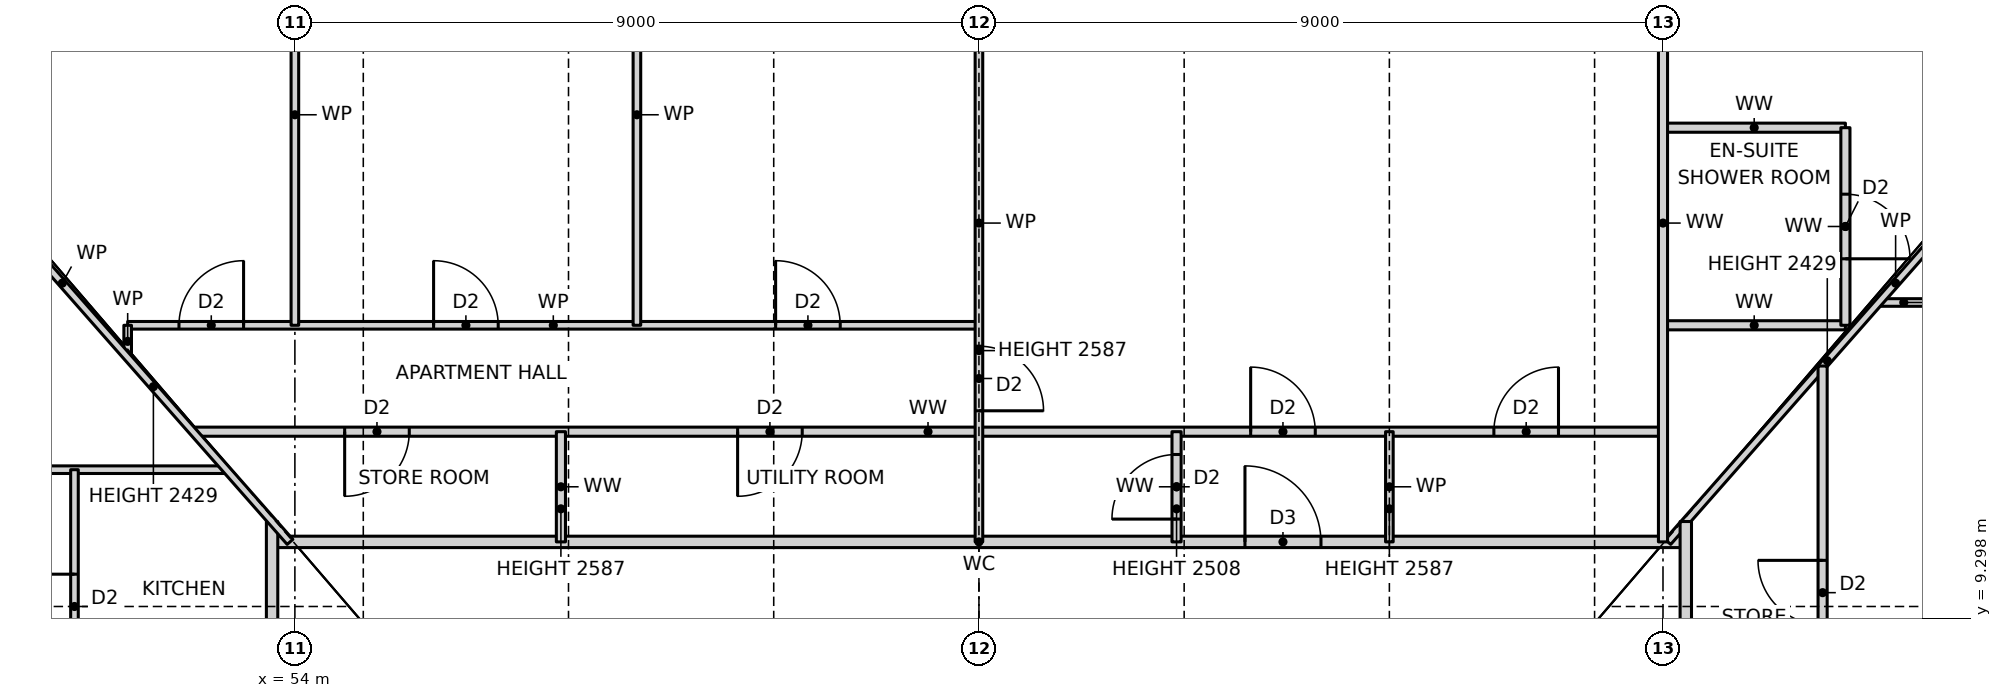
"""IFC4 building model, lengths in metres.
Left out: names, types, materials, properties, quantities, classifications, styles, units other than length and angle.
Written with IfcOpenShell. Run it as: python <this file> out.ifc"""

import sys

from ifc_helpers import new_model, si_unit, direction, frame, frame_2d, origin, place, context, subcontext, project, spatial, rectangle, extrude, element, fill, save


model = new_model("IFC4")
c1 = context("Model", 3, precision=1e-05, world=origin(), true_north=direction((0.0, 1.0)))
c2 = subcontext(c1, "Body", "Model", "MODEL_VIEW")
j1 = project(units=[si_unit("LENGTHUNIT", "METRE"), si_unit("PLANEANGLEUNIT", "RADIAN")], contexts=[c1])
p1 = place(None, origin())
s1 = spatial("IfcSite", under=j1, at=p1, CompositionType="ELEMENT")
p2 = place(p1, origin())
s2 = spatial("IfcBuilding", under=s1, at=p2, CompositionType="ELEMENT")
p3 = place(p2, frame((0.0, 0.0, 46.5)))
s3 = spatial("IfcBuildingStorey", under=s2, at=p3, CompositionType="ELEMENT", Elevation=46.5)
p4 = place(p3, frame((53.7, 10.3, 0.0), z_axis=(0.0, 0.0, 1.0), x_axis=(1.0, 0.0, 0.0)))
e1 = element("IfcWall", 1, at=p4, inside=s3, PredefinedType="PARTITIONING", context=c2, shape_type="SweptSolid", body=[
    extrude(rectangle(XDim=18.6, YDim=0.15, at=frame_2d((9.3, 0.0))), origin(), (0.0, 0.0, 1.0), 3.27),
])
p5 = place(p4, frame((12.8, 0.0, 0.0)))
e2 = element("IfcOpeningElement", 2, at=p5, cuts=e1, PredefinedType="OPENING", context=c2, shape_type="SweptSolid", body=[
    extrude(rectangle(XDim=1.0, YDim=2.1, at=frame_2d((0.5, 1.05))), frame((0.0, 0.085, 0.0), z_axis=(0.0, -1.0, 0.0), x_axis=(1.0, 0.0, 0.0)), (0.0, 0.0, 1.0), 0.17),
])
p6 = place(p3, frame((46.56, 11.25, 0.0), z_axis=(0.0, 0.0, 1.0), x_axis=(1.0, 0.0, 0.0)))
e3 = element("IfcWall", 3, at=p6, inside=s3, PredefinedType="PARTITIONING", context=c2, shape_type="SweptSolid", body=[
    extrude(rectangle(XDim=6.54, YDim=0.1, at=frame_2d((3.27, 0.0))), origin(), (0.0, 0.0, 1.0), 3.27),
])
p7 = place(p6, frame((1.845, 0.0, 0.0)))
e4 = element("IfcOpeningElement", 4, at=p7, cuts=e3, PredefinedType="OPENING", context=c2, shape_type="SweptSolid", body=[
    extrude(rectangle(XDim=0.85, YDim=2.1, at=frame_2d((0.425, 1.05))), frame((0.0, 0.06, 0.0), z_axis=(0.0, -1.0, 0.0), x_axis=(1.0, 0.0, 0.0)), (0.0, 0.0, 1.0), 0.12),
])
p8 = place(p3, frame((52.66, 11.75, 0.0), z_axis=(0.0, 0.0, 1.0), x_axis=(1.0, 0.0, 0.0)))
e5 = element("IfcWall", 5, at=p8, inside=s3, PredefinedType="PARTITIONING", context=c2, shape_type="SweptSolid", body=[
    extrude(rectangle(XDim=19.34, YDim=0.12, at=frame_2d((9.67, 0.0))), origin(), (0.0, 0.0, 1.0), 3.27),
])
p9 = place(p8, frame((17.115, 0.0, 0.0)))
e6 = element("IfcOpeningElement", 6, at=p9, cuts=e5, PredefinedType="OPENING", context=c2, shape_type="SweptSolid", body=[
    extrude(rectangle(XDim=0.85, YDim=2.1, at=frame_2d((0.425, 1.05))), frame((0.0, 0.07, 0.0), z_axis=(0.0, -1.0, 0.0), x_axis=(1.0, 0.0, 0.0)), (0.0, 0.0, 1.0), 0.14),
])
p10 = place(p8, frame((13.915, 0.0, 0.0)))
e7 = element("IfcOpeningElement", 7, at=p10, cuts=e5, PredefinedType="OPENING", context=c2, shape_type="SweptSolid", body=[
    extrude(rectangle(XDim=0.85, YDim=2.1, at=frame_2d((0.425, 1.05))), frame((0.0, 0.07, 0.0), z_axis=(0.0, -1.0, 0.0), x_axis=(1.0, 0.0, 0.0)), (0.0, 0.0, 1.0), 0.14),
])
p11 = place(p8, frame((7.165, 0.0, 0.0)))
e8 = element("IfcOpeningElement", 8, at=p11, cuts=e5, PredefinedType="OPENING", context=c2, shape_type="SweptSolid", body=[
    extrude(rectangle(XDim=0.85, YDim=2.1, at=frame_2d((0.425, 1.05))), frame((0.0, 0.07, 0.0), z_axis=(0.0, -1.0, 0.0), x_axis=(1.0, 0.0, 0.0)), (0.0, 0.0, 1.0), 0.14),
])
p12 = place(p8, frame((1.995, 0.0, 0.0)))
e9 = element("IfcOpeningElement", 9, at=p12, cuts=e5, PredefinedType="OPENING", context=c2, shape_type="SweptSolid", body=[
    extrude(rectangle(XDim=0.85, YDim=2.1, at=frame_2d((0.425, 1.05))), frame((0.0, 0.07, 0.0), z_axis=(0.0, -1.0, 0.0), x_axis=(1.0, 0.0, 0.0)), (0.0, 0.0, 1.0), 0.14),
])
p13 = place(p3, frame((51.8, 13.15, 0.0), z_axis=(0.0, 0.0, 1.0), x_axis=(1.0, 0.0, 0.0)))
e10 = element("IfcWall", 10, at=p13, inside=s3, PredefinedType="PARTITIONING", context=c2, shape_type="SweptSolid", body=[
    extrude(rectangle(XDim=11.2, YDim=0.1, at=frame_2d((5.6, 0.0))), origin(), (0.0, 0.0, 1.0), 3.27),
])
p14 = place(p13, frame((8.525, 0.0, 0.0)))
e11 = element("IfcOpeningElement", 11, at=p14, cuts=e10, PredefinedType="OPENING", context=c2, shape_type="SweptSolid", body=[
    extrude(rectangle(XDim=0.85, YDim=2.1, at=frame_2d((0.425, 1.05))), frame((0.0, 0.06, 0.0), z_axis=(0.0, -1.0, 0.0), x_axis=(1.0, 0.0, 0.0)), (0.0, 0.0, 1.0), 0.12),
])
p15 = place(p13, frame((4.025, 0.0, 0.0)))
e12 = element("IfcOpeningElement", 12, at=p15, cuts=e10, PredefinedType="OPENING", context=c2, shape_type="SweptSolid", body=[
    extrude(rectangle(XDim=0.85, YDim=2.1, at=frame_2d((0.425, 1.05))), frame((0.0, 0.06, 0.0), z_axis=(0.0, -1.0, 0.0), x_axis=(1.0, 0.0, 0.0)), (0.0, 0.0, 1.0), 0.12),
])
p16 = place(p13, frame((0.675, 0.0, 0.0)))
e13 = element("IfcOpeningElement", 13, at=p16, cuts=e10, PredefinedType="OPENING", context=c2, shape_type="SweptSolid", body=[
    extrude(rectangle(XDim=0.85, YDim=2.1, at=frame_2d((0.425, 1.05))), frame((0.0, 0.06, 0.0), z_axis=(0.0, -1.0, 0.0), x_axis=(1.0, 0.0, 0.0)), (0.0, 0.0, 1.0), 0.12),
])
p17 = place(p3, frame((72.0, 13.15, 0.0), z_axis=(0.0, 0.0, 1.0), x_axis=(1.0, 0.0, 0.0)))
e14 = element("IfcWall", 14, at=p17, inside=s3, PredefinedType="PARTITIONING", context=c2, shape_type="SweptSolid", body=[
    extrude(rectangle(XDim=2.4, YDim=0.12, at=frame_2d((1.2, 0.0))), origin(), (0.0, 0.0, 1.0), 3.27),
])
p18 = place(p3, frame((74.836, 13.45, 0.0), z_axis=(0.0, 0.0, 1.0), x_axis=(1.0, 0.0, 0.0)))
e15 = element("IfcWall", 15, at=p18, inside=s3, PredefinedType="PARTITIONING", context=c2, shape_type="SweptSolid", body=[
    extrude(rectangle(XDim=0.664, YDim=0.1, at=frame_2d((0.332, 0.0))), origin(), (0.0, 0.0, 1.0), 3.27),
])
p19 = place(p3, frame((72.0, 15.75, 0.0), z_axis=(0.0, 0.0, 1.0), x_axis=(1.0, 0.0, 0.0)))
e16 = element("IfcWall", 16, at=p19, inside=s3, PredefinedType="PARTITIONING", context=c2, shape_type="SweptSolid", body=[
    extrude(rectangle(XDim=2.4, YDim=0.12, at=frame_2d((1.2, 0.0))), origin(), (0.0, 0.0, 1.0), 3.27),
])
p20 = place(p3, frame((72.064, 10.3, 0.0), z_axis=(0.0, 0.0, 1.0), x_axis=(0.660700699661, 0.750649442461, 0.0)))
e17 = element("IfcWall", 17, at=p20, inside=s3, PredefinedType="PARTITIONING", context=c2, shape_type="SweptSolid", body=[
    extrude(rectangle(XDim=9.071, YDim=0.1, at=frame_2d((4.535, 0.0))), origin(), (0.0, 0.0, 1.0), 2.429),
])
p21 = place(p3, frame((74.4, 13.15, 0.0), z_axis=(0.0, 0.0, 1.0), x_axis=(0.0, 1.0, 0.0)))
e18 = element("IfcWall", 18, at=p21, inside=s3, PredefinedType="PARTITIONING", context=c2, shape_type="SweptSolid", body=[
    extrude(rectangle(XDim=2.6, YDim=0.12, at=frame_2d((1.3, 0.0))), origin(), (0.0, 0.0, 1.0), 3.27),
])
p22 = place(p21, frame((0.875, 0.0, 0.0)))
e19 = element("IfcOpeningElement", 19, at=p22, cuts=e18, PredefinedType="OPENING", context=c2, shape_type="SweptSolid", body=[
    extrude(rectangle(XDim=0.85, YDim=2.1, at=frame_2d((0.425, 1.05))), frame((0.0, 0.07, 0.0), z_axis=(0.0, -1.0, 0.0), x_axis=(1.0, 0.0, 0.0)), (0.0, 0.0, 1.0), 0.14),
])
p23 = place(p3, frame((74.1, -12.614, 0.0), z_axis=(0.0, 0.0, 1.0), x_axis=(0.0, 1.0, 0.0)))
e20 = element("IfcWall", 20, at=p23, inside=s3, PredefinedType="PARTITIONING", context=c2, shape_type="SweptSolid", body=[
    extrude(rectangle(XDim=25.228, YDim=0.12, at=frame_2d((12.614, 0.0))), origin(), (0.0, 0.0, 1.0), 3.27),
])
p24 = place(p23, frame((7.239, 0.0, 0.0)))
e21 = element("IfcOpeningElement", 21, at=p24, cuts=e20, PredefinedType="OPENING", context=c2, shape_type="SweptSolid", body=[
    extrude(rectangle(XDim=0.85, YDim=2.1, at=frame_2d((0.425, 1.05))), frame((0.0, 0.07, 0.0), z_axis=(0.0, -1.0, 0.0), x_axis=(1.0, 0.0, 0.0)), (0.0, 0.0, 1.0), 0.14),
])
p25 = place(p23, frame((10.439, 0.0, 0.0)))
e22 = element("IfcOpeningElement", 22, at=p25, cuts=e20, PredefinedType="OPENING", context=c2, shape_type="SweptSolid", body=[
    extrude(rectangle(XDim=0.85, YDim=2.1, at=frame_2d((0.425, 1.05))), frame((0.0, 0.07, 0.0), z_axis=(0.0, -1.0, 0.0), x_axis=(1.0, 0.0, 0.0)), (0.0, 0.0, 1.0), 0.14),
])
p26 = place(p23, frame((2.507, 0.0, 0.0)))
e23 = element("IfcOpeningElement", 23, at=p26, cuts=e20, PredefinedType="OPENING", context=c2, shape_type="SweptSolid", body=[
    extrude(rectangle(XDim=0.85, YDim=2.1, at=frame_2d((0.425, 1.05))), frame((0.0, 0.07, 0.0), z_axis=(0.0, -1.0, 0.0), x_axis=(1.0, 0.0, 0.0)), (0.0, 0.0, 1.0), 0.14),
])
p27 = place(p23, frame((16.639, 0.0, 0.0)))
e24 = element("IfcOpeningElement", 24, at=p27, cuts=e20, PredefinedType="OPENING", context=c2, shape_type="SweptSolid", body=[
    extrude(rectangle(XDim=0.85, YDim=2.1, at=frame_2d((0.425, 1.05))), frame((0.0, 0.07, 0.0), z_axis=(0.0, -1.0, 0.0), x_axis=(1.0, 0.0, 0.0)), (0.0, 0.0, 1.0), 0.14),
])
p28 = place(p23, frame((21.821, 0.0, 0.0)))
e25 = element("IfcOpeningElement", 25, at=p28, cuts=e20, PredefinedType="OPENING", context=c2, shape_type="SweptSolid", body=[
    extrude(rectangle(XDim=0.85, YDim=2.1, at=frame_2d((0.425, 1.05))), frame((0.0, 0.07, 0.0), z_axis=(0.0, -1.0, 0.0), x_axis=(1.0, 0.0, 0.0)), (0.0, 0.0, 1.0), 0.14),
])
p29 = place(p3, frame((72.3, -10.568, 0.0), z_axis=(0.0, 0.0, 1.0), x_axis=(0.0, 1.0, 0.0)))
e26 = element("IfcWall", 26, at=p29, inside=s3, PredefinedType="PARTITIONING", context=c2, shape_type="SweptSolid", body=[
    extrude(rectangle(XDim=21.136, YDim=0.15, at=frame_2d((10.568, 0.0))), origin(), (0.0, 0.0, 1.0), 3.27),
])
p30 = place(p29, frame((8.318, 0.0, 0.0)))
e27 = element("IfcOpeningElement", 27, at=p30, cuts=e26, PredefinedType="OPENING", context=c2, shape_type="SweptSolid", body=[
    extrude(rectangle(XDim=1.0, YDim=2.1, at=frame_2d((0.5, 1.05))), frame((0.0, 0.085, 0.0), z_axis=(0.0, -1.0, 0.0), x_axis=(1.0, 0.0, 0.0)), (0.0, 0.0, 1.0), 0.17),
])
p31 = place(p3, frame((72.0, 10.3, 0.0), z_axis=(0.0, 0.0, 1.0), x_axis=(0.0, 1.0, 0.0)))
e28 = element("IfcWall", 28, at=p31, inside=s3, PredefinedType="PARTITIONING", context=c2, shape_type="SweptSolid", body=[
    extrude(rectangle(XDim=8.39, YDim=0.12, at=frame_2d((4.195, 0.0))), origin(), (0.0, 0.0, 1.0), 3.27),
])
p32 = place(p31, frame((6.495, 0.0, 0.0)))
e29 = element("IfcOpeningElement", 29, at=p32, cuts=e28, PredefinedType="OPENING", context=c2, shape_type="SweptSolid", body=[
    extrude(rectangle(XDim=0.85, YDim=2.1, at=frame_2d((0.425, 1.05))), frame((0.0, 0.07, 0.0), z_axis=(0.0, -1.0, 0.0), x_axis=(1.0, 0.0, 0.0)), (0.0, 0.0, 1.0), 0.14),
])
p33 = place(p3, frame((68.4, 10.3, 0.0), z_axis=(0.0, 0.0, 1.0), x_axis=(0.0, 1.0, 0.0)))
e30 = element("IfcWall", 30, at=p33, inside=s3, PredefinedType="PARTITIONING", context=c2, shape_type="SweptSolid", body=[
    extrude(rectangle(XDim=1.45, YDim=0.1, at=frame_2d((0.725, 0.0))), origin(), (0.0, 0.0, 1.0), 2.587),
])
p34 = place(p3, frame((65.6, 10.3, 0.0), z_axis=(0.0, 0.0, 1.0), x_axis=(0.0, 1.0, 0.0)))
e31 = element("IfcWall", 31, at=p34, inside=s3, PredefinedType="PARTITIONING", context=c2, shape_type="SweptSolid", body=[
    extrude(rectangle(XDim=1.45, YDim=0.12, at=frame_2d((0.725, 0.0))), origin(), (0.0, 0.0, 1.0), 2.508),
])
p35 = place(p34, frame((0.3, 0.0, 0.0)))
e32 = element("IfcOpeningElement", 32, at=p35, cuts=e31, PredefinedType="OPENING", context=c2, shape_type="SweptSolid", body=[
    extrude(rectangle(XDim=0.85, YDim=2.1, at=frame_2d((0.425, 1.05))), frame((0.0, 0.07, 0.0), z_axis=(0.0, -1.0, 0.0), x_axis=(1.0, 0.0, 0.0)), (0.0, 0.0, 1.0), 0.14),
])
p36 = place(p3, frame((63.0, 10.3, 0.0), z_axis=(0.0, 0.0, 1.0), x_axis=(0.0, 1.0, 0.0)))
e33 = element("IfcWall", 33, at=p36, inside=s3, PredefinedType="PARTITIONING", context=c2, shape_type="SweptSolid", body=[
    extrude(rectangle(XDim=8.39, YDim=0.1, at=frame_2d((4.195, 0.0))), origin(), (0.0, 0.0, 1.0), 2.587),
])
p37 = place(p36, frame((1.725, 0.0, 0.0)))
e34 = element("IfcOpeningElement", 34, at=p37, cuts=e33, PredefinedType="OPENING", context=c2, shape_type="SweptSolid", body=[
    extrude(rectangle(XDim=0.85, YDim=2.1, at=frame_2d((0.425, 1.05))), frame((0.0, 0.06, 0.0), z_axis=(0.0, -1.0, 0.0), x_axis=(1.0, 0.0, 0.0)), (0.0, 0.0, 1.0), 0.12),
])
p38 = place(p3, frame((58.5, 13.15, 0.0), z_axis=(0.0, 0.0, 1.0), x_axis=(0.0, 1.0, 0.0)))
e35 = element("IfcWall", 35, at=p38, inside=s3, PredefinedType="PARTITIONING", context=c2, shape_type="SweptSolid", body=[
    extrude(rectangle(XDim=5.54, YDim=0.1, at=frame_2d((2.77, 0.0))), origin(), (0.0, 0.0, 1.0), 3.27),
])
p39 = place(p3, frame((57.5, 10.3, 0.0), z_axis=(0.0, 0.0, 1.0), x_axis=(0.0, 1.0, 0.0)))
e36 = element("IfcWall", 36, at=p39, inside=s3, PredefinedType="PARTITIONING", context=c2, shape_type="SweptSolid", body=[
    extrude(rectangle(XDim=1.45, YDim=0.12, at=frame_2d((0.725, 0.0))), origin(), (0.0, 0.0, 1.0), 2.587),
])
p40 = place(p3, frame((54.0, 13.15, 0.0), z_axis=(0.0, 0.0, 1.0), x_axis=(0.0, 1.0, 0.0)))
e37 = element("IfcWall", 37, at=p40, inside=s3, PredefinedType="PARTITIONING", context=c2, shape_type="SweptSolid", body=[
    extrude(rectangle(XDim=5.54, YDim=0.1, at=frame_2d((2.77, 0.0))), origin(), (0.0, 0.0, 1.0), 3.27),
])
p41 = place(p3, frame((53.7, -10.568, 0.0), z_axis=(0.0, 0.0, 1.0), x_axis=(0.0, 1.0, 0.0)))
e38 = element("IfcWall", 38, at=p41, inside=s3, PredefinedType="PARTITIONING", context=c2, shape_type="SweptSolid", body=[
    extrude(rectangle(XDim=21.136, YDim=0.15, at=frame_2d((10.568, 0.0))), origin(), (0.0, 0.0, 1.0), 3.27),
])
p42 = place(p41, frame((16.318, 0.0, 0.0)))
e39 = element("IfcOpeningElement", 39, at=p42, cuts=e38, PredefinedType="OPENING", context=c2, shape_type="SweptSolid", body=[
    extrude(rectangle(XDim=1.0, YDim=2.1, at=frame_2d((0.5, 1.05))), frame((0.0, 0.085, 0.0), z_axis=(0.0, -1.0, 0.0), x_axis=(1.0, 0.0, 0.0)), (0.0, 0.0, 1.0), 0.17),
])
p43 = place(p41, frame((10.918, 0.0, 0.0)))
e40 = element("IfcOpeningElement", 40, at=p43, cuts=e38, PredefinedType="OPENING", context=c2, shape_type="SweptSolid", body=[
    extrude(rectangle(XDim=1.0, YDim=2.1, at=frame_2d((0.5, 1.05))), frame((0.0, 0.085, 0.0), z_axis=(0.0, -1.0, 0.0), x_axis=(1.0, 0.0, 0.0)), (0.0, 0.0, 1.0), 0.17),
])
p44 = place(p3, frame((51.8, 12.727, 0.0), z_axis=(0.0, 0.0, 1.0), x_axis=(0.0, 1.0, 0.0)))
e41 = element("IfcWall", 41, at=p44, inside=s3, PredefinedType="PARTITIONING", context=c2, shape_type="SweptSolid", body=[
    extrude(rectangle(XDim=0.423, YDim=0.1, at=frame_2d((0.211, 0.0))), origin(), (0.0, 0.0, 1.0), 3.27),
])
p45 = place(p3, frame((51.1, 2.25, 0.0), z_axis=(0.0, 0.0, 1.0), x_axis=(0.0, 1.0, 0.0)))
e42 = element("IfcWall", 42, at=p45, inside=s3, PredefinedType="PARTITIONING", context=c2, shape_type="SweptSolid", body=[
    extrude(rectangle(XDim=9.0, YDim=0.1, at=frame_2d((4.5, 0.0))), origin(), (0.0, 0.0, 1.0), 3.27),
])
p46 = place(p45, frame((6.775, 0.0, 0.0)))
e43 = element("IfcOpeningElement", 43, at=p46, cuts=e42, PredefinedType="OPENING", context=c2, shape_type="SweptSolid", body=[
    extrude(rectangle(XDim=0.85, YDim=2.1, at=frame_2d((0.425, 1.05))), frame((0.0, 0.06, 0.0), z_axis=(0.0, -1.0, 0.0), x_axis=(1.0, 0.0, 0.0)), (0.0, 0.0, 1.0), 0.12),
])
p47 = place(p45, frame((3.575, 0.0, 0.0)))
e44 = element("IfcOpeningElement", 44, at=p47, cuts=e42, PredefinedType="OPENING", context=c2, shape_type="SweptSolid", body=[
    extrude(rectangle(XDim=0.85, YDim=2.1, at=frame_2d((0.425, 1.05))), frame((0.0, 0.06, 0.0), z_axis=(0.0, -1.0, 0.0), x_axis=(1.0, 0.0, 0.0)), (0.0, 0.0, 1.0), 0.12),
])
p48 = place(p3, frame((53.936, 10.3, 0.0), z_axis=(0.0, 0.0, 1.0), x_axis=(-0.660638210404, 0.750704439146, 0.0)))
e45 = element("IfcWall", 45, at=p48, inside=s3, PredefinedType="PARTITIONING", context=c2, shape_type="SweptSolid", body=[
    extrude(rectangle(XDim=9.07, YDim=0.1, at=frame_2d((4.535, 0.0))), origin(), (0.0, 0.0, 1.0), 2.429),
])
p49 = place(p28, origin())
e46 = element("IfcDoor", 46, at=p49, inside=s3, OperationType="SINGLE_SWING_RIGHT", PredefinedType="DOOR", context=c2, shape_type="SweptSolid", body=[
    extrude(rectangle(XDim=0.85, YDim=2.1, at=frame_2d((0.425, 1.05))), frame((0.0, 0.025, 0.0), z_axis=(0.0, -1.0, 0.0), x_axis=(1.0, 0.0, 0.0)), (0.0, 0.0, 1.0), 0.05),
])
fill(e25, e46)
p50 = place(p9, origin())
e47 = element("IfcDoor", 47, at=p50, inside=s3, OperationType="SINGLE_SWING_RIGHT", PredefinedType="DOOR", context=c2, shape_type="SweptSolid", body=[
    extrude(rectangle(XDim=0.85, YDim=2.1, at=frame_2d((0.425, 1.05))), frame((0.0, 0.025, 0.0), z_axis=(0.0, -1.0, 0.0), x_axis=(1.0, 0.0, 0.0)), (0.0, 0.0, 1.0), 0.05),
])
fill(e6, e47)
p51 = place(p5, origin())
e48 = element("IfcDoor", 48, at=p51, inside=s3, OperationType="SINGLE_SWING_LEFT", PredefinedType="DOOR", context=c2, shape_type="SweptSolid", body=[
    extrude(rectangle(XDim=1.0, YDim=2.1, at=frame_2d((0.5, 1.05))), frame((0.0, 0.025, 0.0), z_axis=(0.0, -1.0, 0.0), x_axis=(1.0, 0.0, 0.0)), (0.0, 0.0, 1.0), 0.05),
])
fill(e2, e48)
p52 = place(p10, origin())
e49 = element("IfcDoor", 49, at=p52, inside=s3, OperationType="SINGLE_SWING_LEFT", PredefinedType="DOOR", context=c2, shape_type="SweptSolid", body=[
    extrude(rectangle(XDim=0.85, YDim=2.1, at=frame_2d((0.425, 1.05))), frame((0.0, 0.025, 0.0), z_axis=(0.0, -1.0, 0.0), x_axis=(1.0, 0.0, 0.0)), (0.0, 0.0, 1.0), 0.05),
])
fill(e7, e49)
p53 = place(p35, origin())
e50 = element("IfcDoor", 50, at=p53, inside=s3, OperationType="SINGLE_SWING_LEFT", PredefinedType="DOOR", context=c2, shape_type="SweptSolid", body=[
    extrude(rectangle(XDim=0.85, YDim=2.1, at=frame_2d((0.425, 1.05))), frame((0.0, 0.025, 0.0), z_axis=(0.0, -1.0, 0.0), x_axis=(1.0, 0.0, 0.0)), (0.0, 0.0, 1.0), 0.05),
])
fill(e32, e50)
p54 = place(p22, frame((0.85, 0.0, 0.0), z_axis=(0.0, 0.0, 1.0), x_axis=(-1.0, 0.0, 0.0)))
e51 = element("IfcDoor", 51, at=p54, inside=s3, OperationType="SINGLE_SWING_RIGHT", PredefinedType="DOOR", context=c2, shape_type="SweptSolid", body=[
    extrude(rectangle(XDim=0.85, YDim=2.1, at=frame_2d((0.425, 1.05))), frame((0.0, 0.025, 0.0), z_axis=(0.0, -1.0, 0.0), x_axis=(1.0, 0.0, 0.0)), (0.0, 0.0, 1.0), 0.05),
])
fill(e19, e51)
p55 = place(p37, frame((0.85, 0.0, 0.0), z_axis=(0.0, 0.0, 1.0), x_axis=(-1.0, 0.0, 0.0)))
e52 = element("IfcDoor", 52, at=p55, inside=s3, OperationType="SINGLE_SWING_RIGHT", PredefinedType="DOOR", context=c2, shape_type="SweptSolid", body=[
    extrude(rectangle(XDim=0.85, YDim=2.1, at=frame_2d((0.425, 1.05))), frame((0.0, 0.025, 0.0), z_axis=(0.0, -1.0, 0.0), x_axis=(1.0, 0.0, 0.0)), (0.0, 0.0, 1.0), 0.05),
])
fill(e34, e52)
p56 = place(p14, origin())
e53 = element("IfcDoor", 53, at=p56, inside=s3, OperationType="SINGLE_SWING_LEFT", PredefinedType="DOOR", context=c2, shape_type="SweptSolid", body=[
    extrude(rectangle(XDim=0.85, YDim=2.1, at=frame_2d((0.425, 1.05))), frame((0.0, 0.025, 0.0), z_axis=(0.0, -1.0, 0.0), x_axis=(1.0, 0.0, 0.0)), (0.0, 0.0, 1.0), 0.05),
])
fill(e11, e53)
p57 = place(p15, origin())
e54 = element("IfcDoor", 54, at=p57, inside=s3, OperationType="SINGLE_SWING_LEFT", PredefinedType="DOOR", context=c2, shape_type="SweptSolid", body=[
    extrude(rectangle(XDim=0.85, YDim=2.1, at=frame_2d((0.425, 1.05))), frame((0.0, 0.025, 0.0), z_axis=(0.0, -1.0, 0.0), x_axis=(1.0, 0.0, 0.0)), (0.0, 0.0, 1.0), 0.05),
])
fill(e12, e54)
p58 = place(p16, origin())
e55 = element("IfcDoor", 55, at=p58, inside=s3, OperationType="SINGLE_SWING_RIGHT", PredefinedType="DOOR", context=c2, shape_type="SweptSolid", body=[
    extrude(rectangle(XDim=0.85, YDim=2.1, at=frame_2d((0.425, 1.05))), frame((0.0, 0.025, 0.0), z_axis=(0.0, -1.0, 0.0), x_axis=(1.0, 0.0, 0.0)), (0.0, 0.0, 1.0), 0.05),
])
fill(e13, e55)
p59 = place(p11, frame((0.85, 0.0, 0.0), z_axis=(0.0, 0.0, 1.0), x_axis=(-1.0, 0.0, 0.0)))
e56 = element("IfcDoor", 56, at=p59, inside=s3, OperationType="SINGLE_SWING_RIGHT", PredefinedType="DOOR", context=c2, shape_type="SweptSolid", body=[
    extrude(rectangle(XDim=0.85, YDim=2.1, at=frame_2d((0.425, 1.05))), frame((0.0, 0.025, 0.0), z_axis=(0.0, -1.0, 0.0), x_axis=(1.0, 0.0, 0.0)), (0.0, 0.0, 1.0), 0.05),
])
fill(e8, e56)
p60 = place(p12, frame((0.85, 0.0, 0.0), z_axis=(0.0, 0.0, 1.0), x_axis=(-1.0, 0.0, 0.0)))
e57 = element("IfcDoor", 57, at=p60, inside=s3, OperationType="SINGLE_SWING_RIGHT", PredefinedType="DOOR", context=c2, shape_type="SweptSolid", body=[
    extrude(rectangle(XDim=0.85, YDim=2.1, at=frame_2d((0.425, 1.05))), frame((0.0, 0.025, 0.0), z_axis=(0.0, -1.0, 0.0), x_axis=(1.0, 0.0, 0.0)), (0.0, 0.0, 1.0), 0.05),
])
fill(e9, e57)
p61 = place(p46, origin())
e58 = element("IfcDoor", 58, at=p61, inside=s3, OperationType="SINGLE_SWING_RIGHT", PredefinedType="DOOR", context=c2, shape_type="SweptSolid", body=[
    extrude(rectangle(XDim=0.85, YDim=2.1, at=frame_2d((0.425, 1.05))), frame((0.0, 0.025, 0.0), z_axis=(0.0, -1.0, 0.0), x_axis=(1.0, 0.0, 0.0)), (0.0, 0.0, 1.0), 0.05),
])
fill(e43, e58)
save(model, sys.argv[1])
